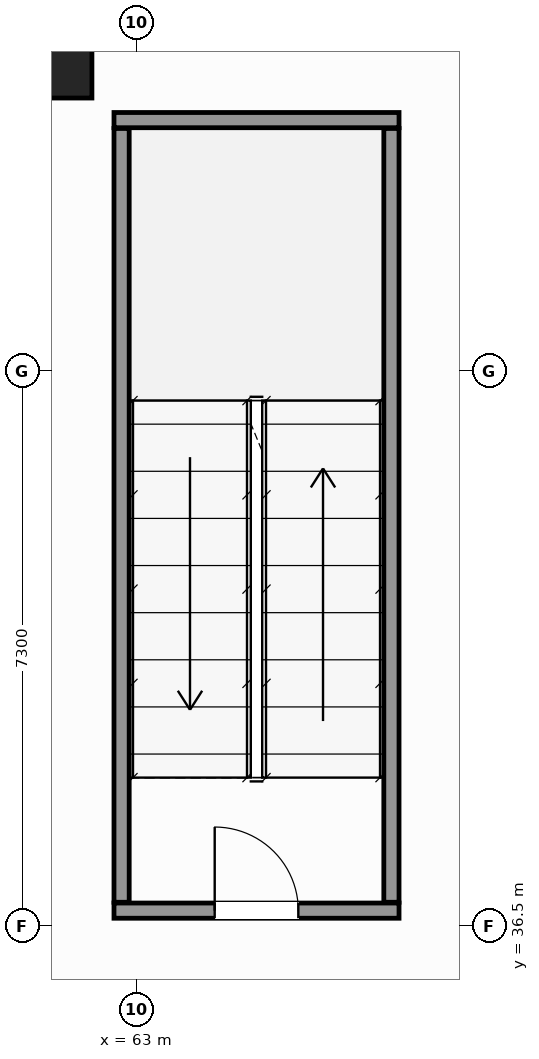
"""IFC4 building model, lengths in metres.
Left out: names, types, materials, properties, quantities, classifications, styles, units other than length and angle.
Written with IfcOpenShell. Run it as: python <this file> out.ifc"""

import sys

from ifc_helpers import new_model, si_unit, direction, frame, frame_2d, origin, origin_2d, place, context, subcontext, project, spatial, rectangle, hollow_circle, extrude, source, transform, mapped, element, fill, save


model = new_model("IFC4")
c1 = context("Model", 3, precision=1e-05, world=origin(), true_north=direction((0.0, 1.0)))
c2 = subcontext(c1, "Body", "Model", "MODEL_VIEW")
j1 = project(units=[si_unit("LENGTHUNIT", "METRE"), si_unit("PLANEANGLEUNIT", "RADIAN")], contexts=[c1])
p1 = place(None, origin())
s1 = spatial("IfcSite", under=j1, at=p1, CompositionType="ELEMENT")
p2 = place(p1, origin())
s2 = spatial("IfcBuilding", under=s1, at=p2, CompositionType="ELEMENT")
p3 = place(p2, frame((0.0, 0.0, -5.2)))
s3 = spatial("IfcBuildingStorey", under=s2, at=p3, CompositionType="ELEMENT", Elevation=-5.2)
m1 = source(origin(), c2, "Body", "SweptSolid", [
    extrude(hollow_circle(Radius=0.61, WallThickness=0.05, at=origin_2d()), origin(), (0.0, 0.0, 1.0), 5.2),
])
p4 = place(p3, frame((61.8, 48.0, 0.0), z_axis=(0.0, 0.0, 1.0), x_axis=(1.0, 0.0, 0.0)))
e1 = element("IfcColumn", 1, at=p4, inside=s3, PredefinedType="COLUMN", context=c2, shape_type="MappedRepresentation", body=[
    mapped(m1, transform((0.0, 0.0, 0.0), scale=1.0)),
])
p5 = place(p3, frame((62.7, 36.7, 0.0), z_axis=(0.0, 0.0, 1.0), x_axis=(1.0, 0.0, 0.0)))
e2 = element("IfcWall", 2, at=p5, inside=s3, PredefinedType="SOLIDWALL", context=c2, shape_type="SweptSolid", body=[
    extrude(rectangle(XDim=3.75, YDim=0.2, at=frame_2d((1.875, 0.0))), origin(), (0.0, 0.0, 1.0), 5.2),
])
p6 = place(p5, frame((1.325, 0.0, 0.0)))
e3 = element("IfcOpeningElement", 3, at=p6, cuts=e2, PredefinedType="OPENING", context=c2, shape_type="SweptSolid", body=[
    extrude(rectangle(XDim=1.1, YDim=2.15, at=frame_2d((0.55, 1.075))), frame((0.0, 0.11, 0.0), z_axis=(0.0, -1.0, 0.0), x_axis=(1.0, 0.0, 0.0)), (0.0, 0.0, 1.0), 0.22),
])
p7 = place(p3, frame((62.7, 47.1, 0.0), z_axis=(0.0, 0.0, 1.0), x_axis=(1.0, 0.0, 0.0)))
e4 = element("IfcWall", 4, at=p7, inside=s3, PredefinedType="SOLIDWALL", context=c2, shape_type="SweptSolid", body=[
    extrude(rectangle(XDim=3.75, YDim=0.2, at=frame_2d((1.875, 0.0))), origin(), (0.0, 0.0, 1.0), 5.2),
])
for number, where, z_axis, x_axis in (
    (5, (62.8, 36.81, 0.0), (0.0, 0.0, 1.0), (0.0, 1.0, 0.0)),
    (6, (66.35, 36.81, 0.0), (0.0, 0.0, 1.0), (0.0, 1.0, 0.0)),
):
    element("IfcWall", number, at=place(p3, frame(where, z_axis=z_axis, x_axis=x_axis)), inside=s3, PredefinedType="SOLIDWALL", context=c2, shape_type="SweptSolid", body=[
        extrude(rectangle(XDim=10.18, YDim=0.2, at=frame_2d((5.09, 0.0))), origin(), (0.0, 0.0, 1.0), 5.2),
    ])
m2 = source(origin(), c2, "Body", "SweptSolid", [
    extrude(rectangle(XDim=1.1, YDim=2.15, at=frame_2d((0.55, 1.075))), frame((0.0, 0.025, 0.0), z_axis=(0.0, -1.0, 0.0), x_axis=(1.0, 0.0, 0.0)), (0.0, 0.0, 1.0), 0.05),
])
p8 = place(p6, origin())
e7 = element("IfcDoor", 7, at=p8, inside=s3, OperationType="SINGLE_SWING_RIGHT", PredefinedType="DOOR", context=c2, shape_type="MappedRepresentation", body=[
    mapped(m2, transform((0.0, 0.0, 0.0), scale=1.0)),
])
fill(e3, e7)
save(model, sys.argv[1])
